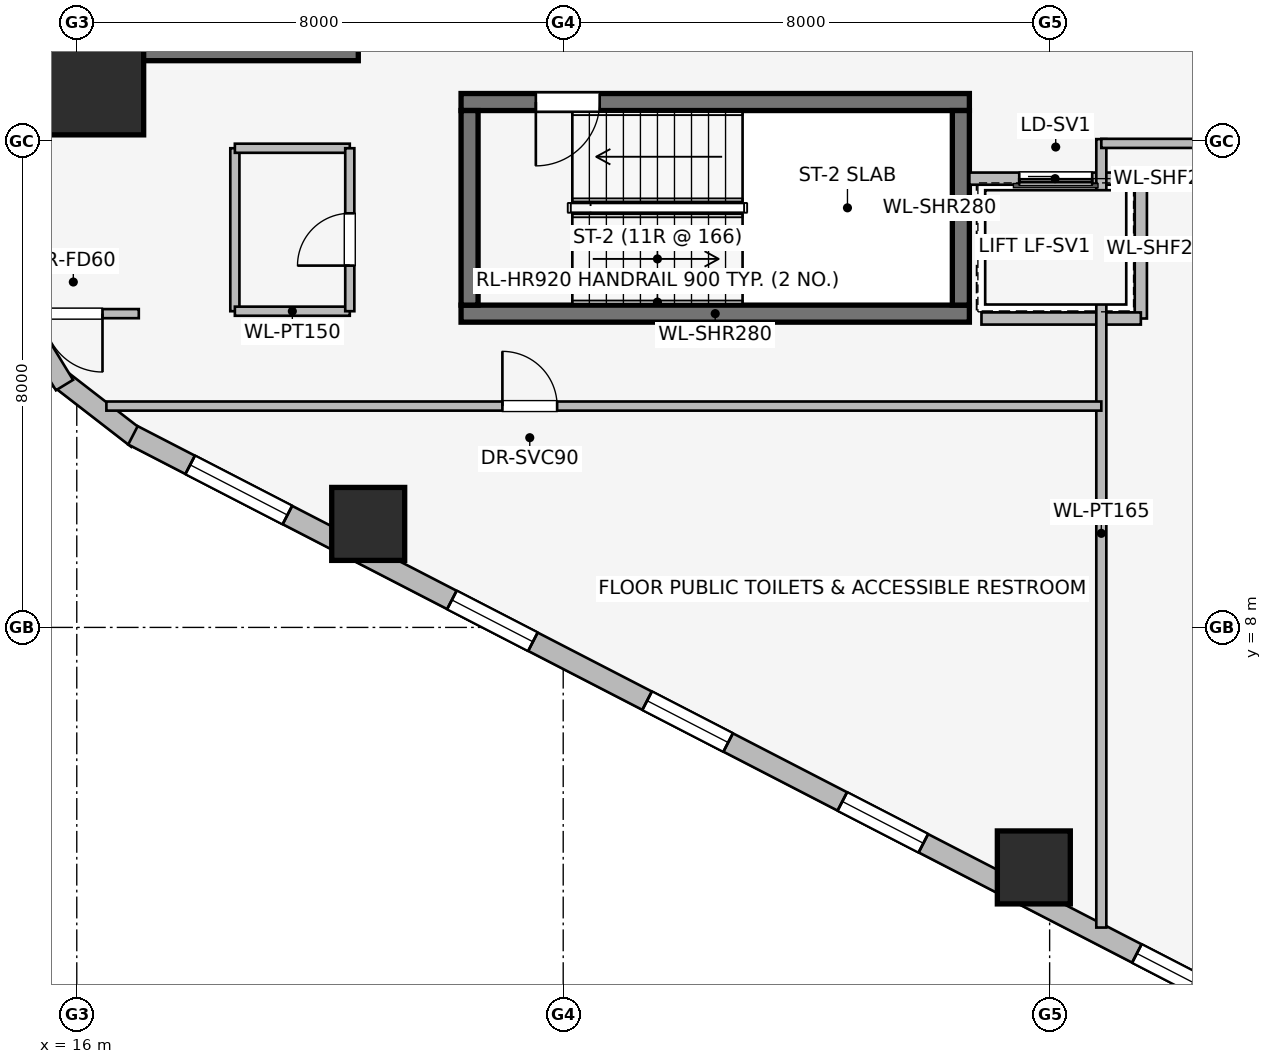
"""IFC4 building model, lengths in metres.
Left out: names, types, materials, properties, quantities, classifications, styles, units other than length and angle.
Written with IfcOpenShell. Run it as: python <this file> out.ifc"""

import sys

from ifc_helpers import new_model, si_unit, direction, frame, frame_2d, origin, origin_2d, place, context, subcontext, project, spatial, rectangle, extrude, element, fill, save


model = new_model("IFC4")
c1 = context("Model", 3, precision=1e-05, world=origin(), true_north=direction((0.0, 1.0)))
c2 = subcontext(c1, "Body", "Model", "MODEL_VIEW")
j1 = project(units=[si_unit("LENGTHUNIT", "METRE"), si_unit("PLANEANGLEUNIT", "RADIAN")], contexts=[c1])
p1 = place(None, origin())
s1 = spatial("IfcSite", under=j1, at=p1, CompositionType="ELEMENT")
p2 = place(p1, origin())
s2 = spatial("IfcBuilding", under=s1, at=p2, CompositionType="ELEMENT")
p3 = place(p2, frame((0.0, 0.0, 56.2)))
s3 = spatial("IfcBuildingStorey", under=s2, at=p3, CompositionType="ELEMENT", Elevation=56.2)
p4 = place(p3, frame((16.87, 17.46, 0.0), z_axis=(0.0, 0.0, 1.0), x_axis=(1.0, 0.0, 0.0)))
e1 = element("IfcWall", 1, at=p4, inside=s3, PredefinedType="SHEAR", context=c2, shape_type="SweptSolid", body=[
    extrude(rectangle(XDim=3.76, YDim=0.28, at=frame_2d((1.88, 0.0))), origin(), (0.0, 0.0, 1.0), 3.65),
])
p5 = place(p3, frame((22.32, 13.16, 0.0), z_axis=(0.0, 0.0, 1.0), x_axis=(1.0, 0.0, 0.0)))
e2 = element("IfcWall", 2, at=p5, inside=s3, PredefinedType="SHEAR", context=c2, shape_type="SweptSolid", body=[
    extrude(rectangle(XDim=8.36, YDim=0.28, at=frame_2d((4.18, 0.0))), origin(), (0.0, 0.0, 1.0), 3.65),
])
p6 = place(p3, frame((30.68, 16.64, 0.0), z_axis=(0.0, 0.0, 1.0), x_axis=(-1.0, 0.0, 0.0)))
e3 = element("IfcWall", 3, at=p6, inside=s3, PredefinedType="SHEAR", context=c2, shape_type="SweptSolid", body=[
    extrude(rectangle(XDim=8.36, YDim=0.28, at=frame_2d((4.18, 0.0))), origin(), (0.0, 0.0, 1.0), 3.65),
])
p7 = place(p6, frame((6.08, 0.0, 0.0)))
e4 = element("IfcOpeningElement", 4, at=p7, cuts=e3, PredefinedType="OPENING", context=c2, shape_type="SweptSolid", body=[
    extrude(rectangle(XDim=1.05, YDim=2.0, at=frame_2d((0.525, 1.0))), frame((0.0, 0.15, 0.0), z_axis=(0.0, -1.0, 0.0), x_axis=(1.0, 0.0, 0.0)), (0.0, 0.0, 1.0), 0.3),
])
for number, where, z_axis, x_axis in (
    (5, (22.46, 16.5, 0.0), (0.0, 0.0, 1.0), (0.0, -1.0, 0.0)),
    (6, (30.54, 13.3, 0.0), (0.0, 0.0, 1.0), (0.0, 1.0, 0.0)),
):
    element("IfcWall", number, at=place(p3, frame(where, z_axis=z_axis, x_axis=x_axis)), inside=s3, PredefinedType="SHEAR", context=c2, shape_type="SweptSolid", body=[
        extrude(rectangle(XDim=3.2, YDim=0.28, at=frame_2d((1.6, 0.0))), origin(), (0.0, 0.0, 1.0), 3.65),
    ])
p8 = place(p3, frame((16.3, 16.9, 0.0), z_axis=(0.0, 0.0, 1.0), x_axis=(1.0, 0.0, 0.0)))
e7 = element("IfcColumn", 7, at=p8, inside=s3, PredefinedType="COLUMN", context=c2, shape_type="SweptSolid", body=[
    extrude(rectangle(XDim=1.6, YDim=1.6, at=origin_2d()), origin(), (0.0, 0.0, 1.0), 3.65),
])
for number, where, z_axis, x_axis in (
    (8, (20.793, 9.702, 0.0), (0.0, 0.0, 1.0), (1.0, 0.0, 0.0)),
    (9, (31.74, 4.053, 0.0), (0.0, 0.0, 1.0), (1.0, 0.0, 0.0)),
):
    element("IfcColumn", number, at=place(p3, frame(where, z_axis=z_axis, x_axis=x_axis)), inside=s3, PredefinedType="COLUMN", context=c2, shape_type="SweptSolid", body=[
        extrude(rectangle(XDim=1.2, YDim=1.2, at=origin_2d()), origin(), (0.0, 0.0, 1.0), 3.65),
    ])
p9 = place(p3, frame((16.998, 11.099, 0.0), z_axis=(0.0, 0.0, 1.0), x_axis=(-0.790691856293, 0.61221433207, 0.0)))
e10 = element("IfcWall", 10, at=p9, inside=s3, PredefinedType="STANDARD", context=c2, shape_type="SweptSolid", body=[
    extrude(rectangle(XDim=1.676, YDim=0.33, at=frame_2d((0.838, 0.0))), origin(), (0.0, 0.0, 1.0), 3.36),
])
p10 = place(p3, frame((15.798, 11.985, 0.0), z_axis=(0.0, 0.0, 1.0), x_axis=(-0.520584129191, 0.853810379671, 0.0)))
e11 = element("IfcWall", 11, at=p10, inside=s3, PredefinedType="STANDARD", context=c2, shape_type="SweptSolid", body=[
    extrude(rectangle(XDim=1.677, YDim=0.33, at=frame_2d((0.838, 0.0))), origin(), (0.0, 0.0, 1.0), 3.36),
])
p11 = place(p3, frame((35.169, 1.743, 0.0), z_axis=(0.0, 0.0, 1.0), x_axis=(-0.888634413993, 0.458616264721, 0.0)))
e12 = element("IfcWall", 12, at=p11, inside=s3, PredefinedType="STANDARD", context=c2, shape_type="SweptSolid", body=[
    extrude(rectangle(XDim=20.531, YDim=0.34, at=frame_2d((10.266, 0.0))), origin(), (0.0, 0.0, 1.0), 2.654),
])
p12 = place(p11, frame((0.902, 0.0, 0.75)))
e13 = element("IfcOpeningElement", 13, at=p12, cuts=e12, PredefinedType="OPENING", context=c2, shape_type="SweptSolid", body=[
    extrude(rectangle(XDim=1.05, YDim=1.4, at=frame_2d((0.525, 0.7))), frame((0.0, 0.18, 0.0), z_axis=(0.0, -1.0, 0.0), x_axis=(1.0, 0.0, 0.0)), (0.0, 0.0, 1.0), 0.36),
])
p13 = place(p11, frame((5.903, 0.0, 0.75)))
e14 = element("IfcOpeningElement", 14, at=p13, cuts=e12, PredefinedType="OPENING", context=c2, shape_type="SweptSolid", body=[
    extrude(rectangle(XDim=1.5, YDim=1.5, at=frame_2d((0.75, 0.75))), frame((0.0, 0.18, 0.0), z_axis=(0.0, -1.0, 0.0), x_axis=(1.0, 0.0, 0.0)), (0.0, 0.0, 1.0), 0.36),
])
p14 = place(p11, frame((9.516, 0.0, 0.75)))
e15 = element("IfcOpeningElement", 15, at=p14, cuts=e12, PredefinedType="OPENING", context=c2, shape_type="SweptSolid", body=[
    extrude(rectangle(XDim=1.5, YDim=1.5, at=frame_2d((0.75, 0.75))), frame((0.0, 0.18, 0.0), z_axis=(0.0, -1.0, 0.0), x_axis=(1.0, 0.0, 0.0)), (0.0, 0.0, 1.0), 0.36),
])
p15 = place(p11, frame((13.129, 0.0, 0.75)))
e16 = element("IfcOpeningElement", 16, at=p15, cuts=e12, PredefinedType="OPENING", context=c2, shape_type="SweptSolid", body=[
    extrude(rectangle(XDim=1.5, YDim=1.5, at=frame_2d((0.75, 0.75))), frame((0.0, 0.18, 0.0), z_axis=(0.0, -1.0, 0.0), x_axis=(1.0, 0.0, 0.0)), (0.0, 0.0, 1.0), 0.36),
])
p16 = place(p11, frame((17.673, 0.0, 0.75)))
e17 = element("IfcOpeningElement", 17, at=p16, cuts=e12, PredefinedType="OPENING", context=c2, shape_type="SweptSolid", body=[
    extrude(rectangle(XDim=1.8, YDim=1.5, at=frame_2d((0.9, 0.75))), frame((0.0, 0.18, 0.0), z_axis=(0.0, -1.0, 0.0), x_axis=(1.0, 0.0, 0.0)), (0.0, 0.0, 1.0), 0.36),
])
p17 = place(p3, frame((33.5, 15.38, 0.0), z_axis=(0.0, 0.0, 1.0), x_axis=(-1.0, 0.0, 0.0)))
e18 = element("IfcWall", 18, at=p17, inside=s3, PredefinedType="PARTITIONING", context=c2, shape_type="SweptSolid", body=[
    extrude(rectangle(XDim=2.82, YDim=0.2, at=frame_2d((1.41, 0.0))), origin(), (0.0, 0.0, 1.0), 3.36),
])
p18 = place(p17, frame((0.8, 0.0, 0.0)))
e19 = element("IfcOpeningElement", 19, at=p18, cuts=e18, PredefinedType="OPENING", context=c2, shape_type="SweptSolid", body=[
    extrude(rectangle(XDim=1.2, YDim=2.2, at=frame_2d((0.6, 1.1))), frame((0.0, 0.11, 0.0), z_axis=(0.0, -1.0, 0.0), x_axis=(1.0, 0.0, 0.0)), (0.0, 0.0, 1.0), 0.22),
])
p19 = place(p3, frame((33.5, 13.08, 0.0), z_axis=(0.0, 0.0, 1.0), x_axis=(0.0, 1.0, 0.0)))
e20 = element("IfcWall", 20, at=p19, inside=s3, PredefinedType="PARTITIONING", context=c2, shape_type="SweptSolid", body=[
    extrude(rectangle(XDim=2.3, YDim=0.2, at=frame_2d((1.15, 0.0))), origin(), (0.0, 0.0, 1.0), 3.36),
])
p20 = place(p3, frame((30.879, 13.08, 0.0), z_axis=(0.0, 0.0, 1.0), x_axis=(1.0, 0.0, 0.0)))
e21 = element("IfcWall", 21, at=p20, inside=s3, PredefinedType="PARTITIONING", context=c2, shape_type="SweptSolid", body=[
    extrude(rectangle(XDim=2.621, YDim=0.2, at=frame_2d((1.311, 0.0))), origin(), (0.0, 0.0, 1.0), 3.36),
])
p21 = place(p3, frame((18.6, 15.88, 0.0), z_axis=(0.0, 0.0, 1.0), x_axis=(0.0, -1.0, 0.0)))
e22 = element("IfcWall", 22, at=p21, inside=s3, PredefinedType="PARTITIONING", context=c2, shape_type="SweptSolid", body=[
    extrude(rectangle(XDim=2.68, YDim=0.15, at=frame_2d((1.34, 0.0))), origin(), (0.0, 0.0, 1.0), 3.36),
])
for number, where, z_axis, x_axis in (
    (23, (18.6, 13.2, 0.0), (0.0, 0.0, 1.0), (1.0, 0.0, 0.0)),
    (24, (18.6, 15.88, 0.0), (0.0, 0.0, 1.0), (1.0, 0.0, 0.0)),
):
    element("IfcWall", number, at=place(p3, frame(where, z_axis=z_axis, x_axis=x_axis)), inside=s3, PredefinedType="PARTITIONING", context=c2, shape_type="SweptSolid", body=[
        extrude(rectangle(XDim=1.89, YDim=0.15, at=frame_2d((0.945, 0.0))), origin(), (0.0, 0.0, 1.0), 3.36),
    ])
p22 = place(p3, frame((20.49, 13.2, 0.0), z_axis=(0.0, 0.0, 1.0), x_axis=(0.0, 1.0, 0.0)))
e25 = element("IfcWall", 25, at=p22, inside=s3, PredefinedType="PARTITIONING", context=c2, shape_type="SweptSolid", body=[
    extrude(rectangle(XDim=2.68, YDim=0.15, at=frame_2d((1.34, 0.0))), origin(), (0.0, 0.0, 1.0), 3.36),
])
p23 = place(p22, frame((0.75, 0.0, 0.0)))
e26 = element("IfcOpeningElement", 26, at=p23, cuts=e25, PredefinedType="OPENING", context=c2, shape_type="SweptSolid", body=[
    extrude(rectangle(XDim=0.86, YDim=2.0, at=frame_2d((0.43, 1.0))), frame((0.0, 0.085, 0.0), z_axis=(0.0, -1.0, 0.0), x_axis=(1.0, 0.0, 0.0)), (0.0, 0.0, 1.0), 0.17),
])
p24 = place(p3, frame((32.85, 3.064, 0.0), z_axis=(0.0, 0.0, 1.0), x_axis=(0.0, 1.0, 0.0)))
e27 = element("IfcWall", 27, at=p24, inside=s3, PredefinedType="PARTITIONING", context=c2, shape_type="SweptSolid", body=[
    extrude(rectangle(XDim=12.966, YDim=0.165, at=frame_2d((6.483, 0.0))), origin(), (0.0, 0.0, 1.0), 3.36),
])
p25 = place(p3, frame((16.487, 11.64, 0.0), z_axis=(0.0, 0.0, 1.0), x_axis=(1.0, 0.0, 0.0)))
e28 = element("IfcWall", 28, at=p25, inside=s3, PredefinedType="PARTITIONING", context=c2, shape_type="SweptSolid", body=[
    extrude(rectangle(XDim=16.363, YDim=0.15, at=frame_2d((8.182, 0.0))), origin(), (0.0, 0.0, 1.0), 3.36),
])
p26 = place(p25, frame((6.513, 0.0, 0.0)))
e29 = element("IfcOpeningElement", 29, at=p26, cuts=e28, PredefinedType="OPENING", context=c2, shape_type="SweptSolid", body=[
    extrude(rectangle(XDim=0.9, YDim=2.0, at=frame_2d((0.45, 1.0))), frame((0.0, 0.085, 0.0), z_axis=(0.0, -1.0, 0.0), x_axis=(1.0, 0.0, 0.0)), (0.0, 0.0, 1.0), 0.17),
])
p27 = place(p3, frame((17.02, 13.16, 0.0), z_axis=(0.0, 0.0, 1.0), x_axis=(-1.0, 0.0, 0.0)))
e30 = element("IfcWall", 30, at=p27, inside=s3, PredefinedType="PARTITIONING", context=c2, shape_type="SweptSolid", body=[
    extrude(rectangle(XDim=2.12, YDim=0.15, at=frame_2d((1.06, 0.0))), origin(), (0.0, 0.0, 1.0), 3.36),
])
p28 = place(p27, frame((0.597, 0.0, 0.0)))
e31 = element("IfcOpeningElement", 31, at=p28, cuts=e30, PredefinedType="OPENING", context=c2, shape_type="SweptSolid", body=[
    extrude(rectangle(XDim=0.96, YDim=2.0, at=frame_2d((0.48, 1.0))), frame((0.0, 0.085, 0.0), z_axis=(0.0, -1.0, 0.0), x_axis=(1.0, 0.0, 0.0)), (0.0, 0.0, 1.0), 0.17),
])
p29 = place(p3, frame((32.85, 15.96, 0.0), z_axis=(0.0, 0.0, 1.0), x_axis=(1.0, 0.0, 0.0)))
e32 = element("IfcWall", 32, at=p29, inside=s3, PredefinedType="PARTITIONING", context=c2, shape_type="SweptSolid", body=[
    extrude(rectangle(XDim=27.403, YDim=0.15, at=frame_2d((13.701, 0.0))), origin(), (0.0, 0.0, 1.0), 3.36),
])
p30 = place(p29, frame((13.235, 0.0, 0.0)))
e33 = element("IfcOpeningElement", 33, at=p30, cuts=e32, PredefinedType="OPENING", context=c2, shape_type="SweptSolid", body=[
    extrude(rectangle(XDim=0.96, YDim=2.0, at=frame_2d((0.48, 1.0))), frame((0.0, 0.085, 0.0), z_axis=(0.0, -1.0, 0.0), x_axis=(1.0, 0.0, 0.0)), (0.0, 0.0, 1.0), 0.17),
])
p31 = place(p12, origin())
e34 = element("IfcWindow", 34, at=p31, inside=s3, PartitioningType="SINGLE_PANEL", PredefinedType="WINDOW", context=c2, shape_type="SweptSolid", body=[
    extrude(rectangle(XDim=1.05, YDim=1.4, at=frame_2d((0.525, 0.7))), frame((0.0, 0.03, 0.0), z_axis=(0.0, -1.0, 0.0), x_axis=(1.0, 0.0, 0.0)), (0.0, 0.0, 1.0), 0.06),
])
fill(e13, e34)
p32 = place(p13, origin())
e35 = element("IfcWindow", 35, at=p32, inside=s3, PartitioningType="SINGLE_PANEL", PredefinedType="WINDOW", context=c2, shape_type="SweptSolid", body=[
    extrude(rectangle(XDim=1.5, YDim=1.5, at=frame_2d((0.75, 0.75))), frame((0.0, 0.03, 0.0), z_axis=(0.0, -1.0, 0.0), x_axis=(1.0, 0.0, 0.0)), (0.0, 0.0, 1.0), 0.06),
])
fill(e14, e35)
p33 = place(p14, origin())
e36 = element("IfcWindow", 36, at=p33, inside=s3, PartitioningType="SINGLE_PANEL", PredefinedType="WINDOW", context=c2, shape_type="SweptSolid", body=[
    extrude(rectangle(XDim=1.5, YDim=1.5, at=frame_2d((0.75, 0.75))), frame((0.0, 0.03, 0.0), z_axis=(0.0, -1.0, 0.0), x_axis=(1.0, 0.0, 0.0)), (0.0, 0.0, 1.0), 0.06),
])
fill(e15, e36)
p34 = place(p15, origin())
e37 = element("IfcWindow", 37, at=p34, inside=s3, PartitioningType="SINGLE_PANEL", PredefinedType="WINDOW", context=c2, shape_type="SweptSolid", body=[
    extrude(rectangle(XDim=1.5, YDim=1.5, at=frame_2d((0.75, 0.75))), frame((0.0, 0.03, 0.0), z_axis=(0.0, -1.0, 0.0), x_axis=(1.0, 0.0, 0.0)), (0.0, 0.0, 1.0), 0.06),
])
fill(e16, e37)
p35 = place(p16, origin())
e38 = element("IfcWindow", 38, at=p35, inside=s3, PartitioningType="SINGLE_PANEL", PredefinedType="WINDOW", context=c2, shape_type="SweptSolid", body=[
    extrude(rectangle(XDim=1.8, YDim=1.5, at=frame_2d((0.9, 0.75))), frame((0.0, 0.03, 0.0), z_axis=(0.0, -1.0, 0.0), x_axis=(1.0, 0.0, 0.0)), (0.0, 0.0, 1.0), 0.06),
])
fill(e17, e38)
p36 = place(p7, origin())
e39 = element("IfcDoor", 39, at=p36, inside=s3, OperationType="SINGLE_SWING_RIGHT", PredefinedType="DOOR", context=c2, shape_type="SweptSolid", body=[
    extrude(rectangle(XDim=1.05, YDim=2.0, at=frame_2d((0.525, 1.0))), frame((0.0, 0.025, 0.0), z_axis=(0.0, -1.0, 0.0), x_axis=(1.0, 0.0, 0.0)), (0.0, 0.0, 1.0), 0.05),
])
fill(e4, e39)
p37 = place(p18, origin())
e40 = element("IfcDoor", 40, at=p37, inside=s3, OperationType="SLIDING_TO_RIGHT", PredefinedType="DOOR", context=c2, shape_type="SweptSolid", body=[
    extrude(rectangle(XDim=1.2, YDim=2.2, at=frame_2d((0.6, 1.1))), frame((0.0, 0.025, 0.0), z_axis=(0.0, -1.0, 0.0), x_axis=(1.0, 0.0, 0.0)), (0.0, 0.0, 1.0), 0.05),
])
fill(e19, e40)
p38 = place(p23, origin())
e41 = element("IfcDoor", 41, at=p38, inside=s3, OperationType="SINGLE_SWING_LEFT", PredefinedType="DOOR", context=c2, shape_type="SweptSolid", body=[
    extrude(rectangle(XDim=0.86, YDim=2.0, at=frame_2d((0.43, 1.0))), frame((0.0, 0.025, 0.0), z_axis=(0.0, -1.0, 0.0), x_axis=(1.0, 0.0, 0.0)), (0.0, 0.0, 1.0), 0.05),
])
fill(e26, e41)
p39 = place(p26, origin())
e42 = element("IfcDoor", 42, at=p39, inside=s3, OperationType="SINGLE_SWING_LEFT", PredefinedType="DOOR", context=c2, shape_type="SweptSolid", body=[
    extrude(rectangle(XDim=0.9, YDim=2.0, at=frame_2d((0.45, 1.0))), frame((0.0, 0.025, 0.0), z_axis=(0.0, -1.0, 0.0), x_axis=(1.0, 0.0, 0.0)), (0.0, 0.0, 1.0), 0.05),
])
fill(e29, e42)
p40 = place(p28, origin())
e43 = element("IfcDoor", 43, at=p40, inside=s3, OperationType="SINGLE_SWING_LEFT", PredefinedType="DOOR", context=c2, shape_type="SweptSolid", body=[
    extrude(rectangle(XDim=0.96, YDim=2.0, at=frame_2d((0.48, 1.0))), frame((0.0, 0.025, 0.0), z_axis=(0.0, -1.0, 0.0), x_axis=(1.0, 0.0, 0.0)), (0.0, 0.0, 1.0), 0.05),
])
fill(e31, e43)
save(model, sys.argv[1])
